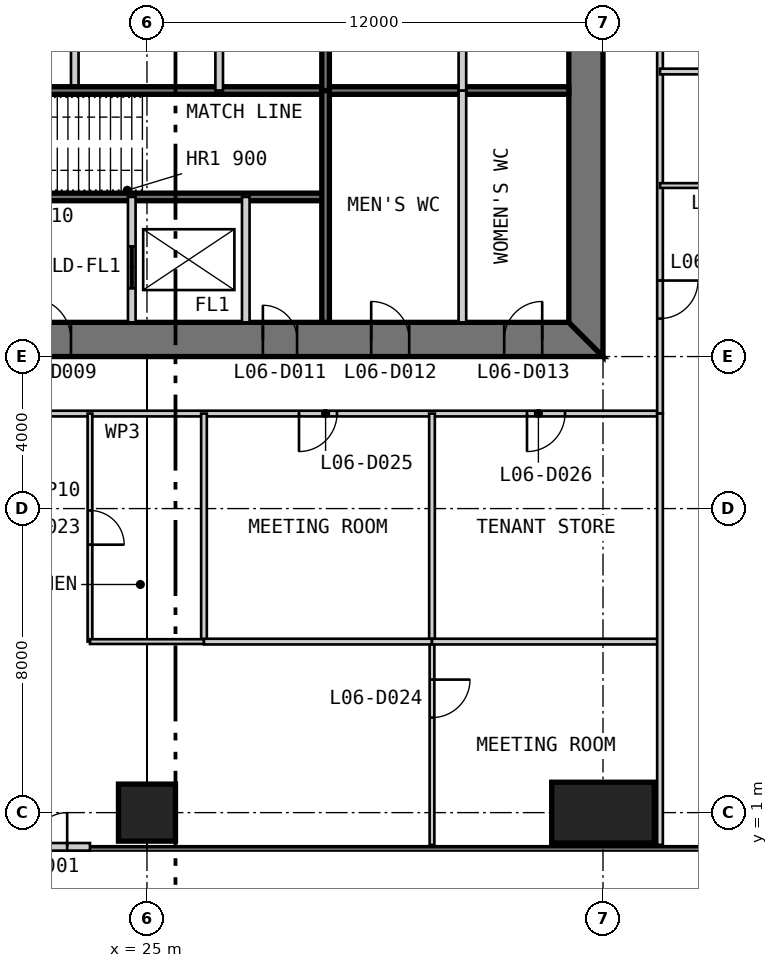
"""IFC4 building model, lengths in metres.
Left out: names, types, materials, properties, quantities, classifications, styles, units other than length and angle.
Written with IfcOpenShell. Run it as: python <this file> out.ifc"""

import sys

from ifc_helpers import new_model, si_unit, direction, frame, frame_2d, origin, origin_2d, place, context, subcontext, project, spatial, polyline, rectangle, outline, extrude, element, fill, save


model = new_model("IFC4")
c1 = context("Model", 3, precision=1e-05, world=origin(), true_north=direction((0.0, 1.0)))
c2 = subcontext(c1, "Body", "Model", "MODEL_VIEW")
j1 = project(units=[si_unit("LENGTHUNIT", "METRE"), si_unit("PLANEANGLEUNIT", "RADIAN")], contexts=[c1])
p1 = place(None, origin())
s1 = spatial("IfcSite", under=j1, at=p1, CompositionType="ELEMENT")
p2 = place(p1, origin())
s2 = spatial("IfcBuilding", under=s1, at=p2, CompositionType="ELEMENT")
p3 = place(p2, frame((0.0, 0.0, 31.0)))
s3 = spatial("IfcBuildingStorey", under=s2, at=p3, CompositionType="ELEMENT", Elevation=31.0)
p4 = place(p3, frame((25.0, 1.0, 0.0), z_axis=(0.0, 0.0, 1.0), x_axis=(1.0, 0.0, 0.0)))
e1 = element("IfcColumn", 1, at=p4, inside=s3, PredefinedType="COLUMN", context=c2, shape_type="SweptSolid", body=[
    extrude(rectangle(XDim=1.5, YDim=1.5, at=origin_2d()), origin(), (0.0, 0.0, 1.0), 4.0),
])
p5 = place(p3, frame((37.0, 1.0, 0.0), z_axis=(0.0, 0.0, 1.0), x_axis=(1.0, 0.0, 0.0)))
e2 = element("IfcColumn", 2, at=p5, inside=s3, PredefinedType="COLUMN", context=c2, shape_type="SweptSolid", body=[
    extrude(rectangle(XDim=2.7, YDim=1.6, at=origin_2d()), origin(), (0.0, 0.0, 1.0), 4.0),
])
p6 = place(p3, frame((13.0, 13.45, 0.0), z_axis=(0.0, 0.0, 1.0), x_axis=(1.0, 0.0, 0.0)))
e3 = element("IfcWall", 3, at=p6, inside=s3, PredefinedType="SHEAR", context=c2, shape_type="SweptSolid", body=[
    extrude(outline(polyline([(0.0, -0.45), (24.0, -0.45), (23.1, 0.45), (0.9, 0.45), (0.0, -0.45)])), origin(), (0.0, 0.0, 1.0), 4.0),
])
p7 = place(p6, frame((4.9, 0.0, 0.0)))
e4 = element("IfcOpeningElement", 4, at=p7, cuts=e3, PredefinedType="OPENING", context=c2, shape_type="SweptSolid", body=[
    extrude(rectangle(XDim=1.0, YDim=2.2, at=frame_2d((0.5, 1.1))), frame((0.0, 0.46, 0.0), z_axis=(0.0, -1.0, 0.0), x_axis=(1.0, 0.0, 0.0)), (0.0, 0.0, 1.0), 0.92),
])
p8 = place(p6, frame((8.9, 0.0, 0.0)))
e5 = element("IfcOpeningElement", 5, at=p8, cuts=e3, PredefinedType="OPENING", context=c2, shape_type="SweptSolid", body=[
    extrude(rectangle(XDim=1.1, YDim=2.2, at=frame_2d((0.55, 1.1))), frame((0.0, 0.46, 0.0), z_axis=(0.0, -1.0, 0.0), x_axis=(1.0, 0.0, 0.0)), (0.0, 0.0, 1.0), 0.92),
])
p9 = place(p6, frame((15.05, 0.0, 0.0)))
e6 = element("IfcOpeningElement", 6, at=p9, cuts=e3, PredefinedType="OPENING", context=c2, shape_type="SweptSolid", body=[
    extrude(rectangle(XDim=0.9, YDim=2.2, at=frame_2d((0.45, 1.1))), frame((0.0, 0.46, 0.0), z_axis=(0.0, -1.0, 0.0), x_axis=(1.0, 0.0, 0.0)), (0.0, 0.0, 1.0), 0.92),
])
p10 = place(p6, frame((17.9, 0.0, 0.0)))
e7 = element("IfcOpeningElement", 7, at=p10, cuts=e3, PredefinedType="OPENING", context=c2, shape_type="SweptSolid", body=[
    extrude(rectangle(XDim=1.0, YDim=2.2, at=frame_2d((0.5, 1.1))), frame((0.0, 0.46, 0.0), z_axis=(0.0, -1.0, 0.0), x_axis=(1.0, 0.0, 0.0)), (0.0, 0.0, 1.0), 0.92),
])
p11 = place(p6, frame((21.4, 0.0, 0.0)))
e8 = element("IfcOpeningElement", 8, at=p11, cuts=e3, PredefinedType="OPENING", context=c2, shape_type="SweptSolid", body=[
    extrude(rectangle(XDim=1.0, YDim=2.2, at=frame_2d((0.5, 1.1))), frame((0.0, 0.46, 0.0), z_axis=(0.0, -1.0, 0.0), x_axis=(1.0, 0.0, 0.0)), (0.0, 0.0, 1.0), 0.92),
])
p12 = place(p3, frame((36.55, 13.9, 0.0), z_axis=(0.0, 0.0, 1.0), x_axis=(0.0, 1.0, 0.0)))
e9 = element("IfcWall", 9, at=p12, inside=s3, PredefinedType="SHEAR", context=c2, shape_type="SweptSolid", body=[
    extrude(outline(polyline([(-0.9, -0.45), (23.1, -0.45), (22.2, 0.45), (0.0, 0.45), (-0.9, -0.45)])), origin(), (0.0, 0.0, 1.0), 4.0),
])
p13 = place(p12, frame((20.2, 0.0, 0.0)))
e10 = element("IfcOpeningElement", 10, at=p13, cuts=e9, PredefinedType="OPENING", context=c2, shape_type="SweptSolid", body=[
    extrude(rectangle(XDim=1.0, YDim=2.2, at=frame_2d((0.5, 1.1))), frame((0.0, 0.46, 0.0), z_axis=(0.0, -1.0, 0.0), x_axis=(1.0, 0.0, 0.0)), (0.0, 0.0, 1.0), 0.92),
])
p14 = place(p12, frame((17.25, 0.0, 0.0)))
e11 = element("IfcOpeningElement", 11, at=p14, cuts=e9, PredefinedType="OPENING", context=c2, shape_type="SweptSolid", body=[
    extrude(rectangle(XDim=0.9, YDim=2.2, at=frame_2d((0.45, 1.1))), frame((0.0, 0.46, 0.0), z_axis=(0.0, -1.0, 0.0), x_axis=(1.0, 0.0, 0.0)), (0.0, 0.0, 1.0), 0.92),
])
p15 = place(p3, frame((20.5, 0.1, 0.0), z_axis=(0.0, 0.0, 1.0), x_axis=(1.0, 0.0, 0.0)))
e12 = element("IfcWall", 12, at=p15, inside=s3, PredefinedType="SOLIDWALL", context=c2, shape_type="SweptSolid", body=[
    extrude(rectangle(XDim=3.0, YDim=0.2, at=frame_2d((1.5, 0.0))), origin(), (0.0, 0.0, 1.0), 3.85),
])
p16 = place(p15, frame((0.6, 0.0, 0.0)))
e13 = element("IfcOpeningElement", 13, at=p16, cuts=e12, PredefinedType="OPENING", context=c2, shape_type="SweptSolid", body=[
    extrude(rectangle(XDim=1.8, YDim=2.4, at=frame_2d((0.9, 1.2))), frame((0.0, 0.11, 0.0), z_axis=(0.0, -1.0, 0.0), x_axis=(1.0, 0.0, 0.0)), (0.0, 0.0, 1.0), 0.22),
])
p17 = place(p3, frame((23.1, 20.0, 0.0), z_axis=(0.0, 0.0, 1.0), x_axis=(0.0, 1.0, 0.0)))
e14 = element("IfcWall", 14, at=p17, inside=s3, PredefinedType="PARTITIONING", context=c2, shape_type="SweptSolid", body=[
    extrude(rectangle(XDim=10.0, YDim=0.2, at=frame_2d((5.0, 0.0))), origin(), (0.0, 0.0, 1.0), 3.8),
])
p18 = place(p3, frame((20.3, 17.2, 0.0), z_axis=(0.0, 0.0, 1.0), x_axis=(1.0, 0.0, 0.0)))
e15 = element("IfcWall", 15, at=p18, inside=s3, PredefinedType="SOLIDWALL", context=c2, shape_type="SweptSolid", body=[
    extrude(rectangle(XDim=9.4, YDim=0.2, at=frame_2d((4.7, 0.0))), origin(), (0.0, 0.0, 1.0), 3.8),
])
p19 = place(p18, frame((0.25, 0.0, 0.0)))
e16 = element("IfcOpeningElement", 16, at=p19, cuts=e15, PredefinedType="OPENING", context=c2, shape_type="SweptSolid", body=[
    extrude(rectangle(XDim=1.0, YDim=2.2, at=frame_2d((0.5, 1.1))), frame((0.0, 0.11, 0.0), z_axis=(0.0, -1.0, 0.0), x_axis=(1.0, 0.0, 0.0)), (0.0, 0.0, 1.0), 0.22),
])
p20 = place(p3, frame((20.3, 20.0, 0.0), z_axis=(0.0, 0.0, 1.0), x_axis=(1.0, 0.0, 0.0)))
e17 = element("IfcWall", 17, at=p20, inside=s3, PredefinedType="SOLIDWALL", context=c2, shape_type="SweptSolid", body=[
    extrude(rectangle(XDim=15.8, YDim=0.2, at=frame_2d((7.9, 0.0))), origin(), (0.0, 0.0, 1.0), 3.8),
])
p21 = place(p3, frame((24.6, 13.9, 0.0), z_axis=(0.0, 0.0, 1.0), x_axis=(0.0, 1.0, 0.0)))
e18 = element("IfcWall", 18, at=p21, inside=s3, PredefinedType="PARTITIONING", context=c2, shape_type="SweptSolid", body=[
    extrude(rectangle(XDim=3.3, YDim=0.2, at=frame_2d((1.65, 0.0))), origin(), (0.0, 0.0, 1.0), 3.8),
])
p22 = place(p21, frame((0.9, 0.0, 0.0)))
e19 = element("IfcOpeningElement", 19, at=p22, cuts=e18, PredefinedType="OPENING", context=c2, shape_type="SweptSolid", body=[
    extrude(rectangle(XDim=1.1, YDim=2.2, at=frame_2d((0.55, 1.1))), frame((0.0, 0.11, 0.0), z_axis=(0.0, -1.0, 0.0), x_axis=(1.0, 0.0, 0.0)), (0.0, 0.0, 1.0), 0.22),
])
p23 = place(p3, frame((27.6, 13.9, 0.0), z_axis=(0.0, 0.0, 1.0), x_axis=(0.0, 1.0, 0.0)))
e20 = element("IfcWall", 20, at=p23, inside=s3, PredefinedType="PARTITIONING", context=c2, shape_type="SweptSolid", body=[
    extrude(rectangle(XDim=3.3, YDim=0.2, at=frame_2d((1.65, 0.0))), origin(), (0.0, 0.0, 1.0), 3.8),
])
p24 = place(p3, frame((29.7, 13.9, 0.0), z_axis=(0.0, 0.0, 1.0), x_axis=(0.0, 1.0, 0.0)))
e21 = element("IfcWall", 21, at=p24, inside=s3, PredefinedType="SOLIDWALL", context=c2, shape_type="SweptSolid", body=[
    extrude(rectangle(XDim=6.1, YDim=0.2, at=frame_2d((3.05, 0.0))), origin(), (0.0, 0.0, 1.0), 3.8),
])
p25 = place(p3, frame((33.3, 13.9, 0.0), z_axis=(0.0, 0.0, 1.0), x_axis=(0.0, 1.0, 0.0)))
e22 = element("IfcWall", 22, at=p25, inside=s3, PredefinedType="PARTITIONING", context=c2, shape_type="SweptSolid", body=[
    extrude(rectangle(XDim=6.1, YDim=0.2, at=frame_2d((3.05, 0.0))), origin(), (0.0, 0.0, 1.0), 3.8),
])
p26 = place(p3, frame((33.3, 36.1, 0.0), z_axis=(0.0, 0.0, 1.0), x_axis=(0.0, -1.0, 0.0)))
e23 = element("IfcWall", 23, at=p26, inside=s3, PredefinedType="PARTITIONING", context=c2, shape_type="SweptSolid", body=[
    extrude(rectangle(XDim=16.1, YDim=0.2, at=frame_2d((8.05, 0.0))), origin(), (0.0, 0.0, 1.0), 3.8),
])
p27 = place(p3, frame((29.7, 36.1, 0.0), z_axis=(0.0, 0.0, 1.0), x_axis=(0.0, -1.0, 0.0)))
e24 = element("IfcWall", 24, at=p27, inside=s3, PredefinedType="SOLIDWALL", context=c2, shape_type="SweptSolid", body=[
    extrude(rectangle(XDim=16.1, YDim=0.2, at=frame_2d((8.05, 0.0))), origin(), (0.0, 0.0, 1.0), 3.8),
])
p28 = place(p3, frame((26.9, 30.0, 0.0), z_axis=(0.0, 0.0, 1.0), x_axis=(0.0, -1.0, 0.0)))
e25 = element("IfcWall", 25, at=p28, inside=s3, PredefinedType="PARTITIONING", context=c2, shape_type="SweptSolid", body=[
    extrude(rectangle(XDim=10.0, YDim=0.2, at=frame_2d((5.0, 0.0))), origin(), (0.0, 0.0, 1.0), 3.8),
])
p29 = place(p3, frame((11.5, 11.5, 0.0), z_axis=(0.0, 0.0, 1.0), x_axis=(1.0, 0.0, 0.0)))
e26 = element("IfcWall", 26, at=p29, inside=s3, PredefinedType="PARTITIONING", context=c2, shape_type="SweptSolid", body=[
    extrude(rectangle(XDim=27.0, YDim=0.15, at=frame_2d((13.5, 0.0))), origin(), (0.0, 0.0, 1.0), 3.85),
])
p30 = place(p29, frame((5.5, 0.0, 0.0)))
e27 = element("IfcOpeningElement", 27, at=p30, cuts=e26, PredefinedType="OPENING", context=c2, shape_type="SweptSolid", body=[
    extrude(rectangle(XDim=1.0, YDim=2.2, at=frame_2d((0.5, 1.1))), frame((0.0, 0.085, 0.0), z_axis=(0.0, -1.0, 0.0), x_axis=(1.0, 0.0, 0.0)), (0.0, 0.0, 1.0), 0.17),
])
p31 = place(p29, frame((17.5, 0.0, 0.0)))
e28 = element("IfcOpeningElement", 28, at=p31, cuts=e26, PredefinedType="OPENING", context=c2, shape_type="SweptSolid", body=[
    extrude(rectangle(XDim=1.0, YDim=2.2, at=frame_2d((0.5, 1.1))), frame((0.0, 0.085, 0.0), z_axis=(0.0, -1.0, 0.0), x_axis=(1.0, 0.0, 0.0)), (0.0, 0.0, 1.0), 0.17),
])
p32 = place(p29, frame((23.5, 0.0, 0.0)))
e29 = element("IfcOpeningElement", 29, at=p32, cuts=e26, PredefinedType="OPENING", context=c2, shape_type="SweptSolid", body=[
    extrude(rectangle(XDim=1.0, YDim=2.2, at=frame_2d((0.5, 1.1))), frame((0.0, 0.085, 0.0), z_axis=(0.0, -1.0, 0.0), x_axis=(1.0, 0.0, 0.0)), (0.0, 0.0, 1.0), 0.17),
])
p33 = place(p3, frame((23.5, 5.5, 0.0), z_axis=(0.0, 0.0, 1.0), x_axis=(0.0, 1.0, 0.0)))
e30 = element("IfcWall", 30, at=p33, inside=s3, PredefinedType="PARTITIONING", context=c2, shape_type="SweptSolid", body=[
    extrude(rectangle(XDim=6.0, YDim=0.125, at=frame_2d((3.0, 0.0))), origin(), (0.0, 0.0, 1.0), 3.85),
])
p34 = place(p33, frame((2.55, 0.0, 0.0)))
e31 = element("IfcOpeningElement", 31, at=p34, cuts=e30, PredefinedType="OPENING", context=c2, shape_type="SweptSolid", body=[
    extrude(rectangle(XDim=0.9, YDim=2.2, at=frame_2d((0.45, 1.1))), frame((0.0, 0.073, 0.0), z_axis=(0.0, -1.0, 0.0), x_axis=(1.0, 0.0, 0.0)), (0.0, 0.0, 1.0), 0.145),
])
p35 = place(p3, frame((26.5, 5.5, 0.0), z_axis=(0.0, 0.0, 1.0), x_axis=(0.0, 1.0, 0.0)))
e32 = element("IfcWall", 32, at=p35, inside=s3, PredefinedType="PARTITIONING", context=c2, shape_type="SweptSolid", body=[
    extrude(rectangle(XDim=6.0, YDim=0.15, at=frame_2d((3.0, 0.0))), origin(), (0.0, 0.0, 1.0), 3.85),
])
p36 = place(p3, frame((32.5, 0.15, 0.0), z_axis=(0.0, 0.0, 1.0), x_axis=(0.0, 1.0, 0.0)))
e33 = element("IfcWall", 33, at=p36, inside=s3, PredefinedType="PARTITIONING", context=c2, shape_type="SweptSolid", body=[
    extrude(rectangle(XDim=5.35, YDim=0.125, at=frame_2d((2.675, 0.0))), origin(), (0.0, 0.0, 1.0), 3.85),
])
p37 = place(p36, frame((3.35, 0.0, 0.0)))
e34 = element("IfcOpeningElement", 34, at=p37, cuts=e33, PredefinedType="OPENING", context=c2, shape_type="SweptSolid", body=[
    extrude(rectangle(XDim=1.0, YDim=2.2, at=frame_2d((0.5, 1.1))), frame((0.0, 0.073, 0.0), z_axis=(0.0, -1.0, 0.0), x_axis=(1.0, 0.0, 0.0)), (0.0, 0.0, 1.0), 0.145),
])
p38 = place(p3, frame((32.5, 5.5, 0.0), z_axis=(0.0, 0.0, 1.0), x_axis=(0.0, 1.0, 0.0)))
e35 = element("IfcWall", 35, at=p38, inside=s3, PredefinedType="PARTITIONING", context=c2, shape_type="SweptSolid", body=[
    extrude(rectangle(XDim=6.0, YDim=0.15, at=frame_2d((3.0, 0.0))), origin(), (0.0, 0.0, 1.0), 3.85),
])
p39 = place(p3, frame((23.5, 5.5, 0.0), z_axis=(0.0, 0.0, 1.0), x_axis=(1.0, 0.0, 0.0)))
e36 = element("IfcWall", 36, at=p39, inside=s3, PredefinedType="PARTITIONING", context=c2, shape_type="SweptSolid", body=[
    extrude(rectangle(XDim=3.0, YDim=0.125, at=frame_2d((1.5, 0.0))), origin(), (0.0, 0.0, 1.0), 3.85),
])
for number, where, z_axis, x_axis in (
    (37, (26.5, 5.5, 0.0), (0.0, 0.0, 1.0), (1.0, 0.0, 0.0)),
    (38, (32.5, 5.5, 0.0), (0.0, 0.0, 1.0), (1.0, 0.0, 0.0)),
):
    element("IfcWall", number, at=place(p3, frame(where, z_axis=z_axis, x_axis=x_axis)), inside=s3, PredefinedType="PARTITIONING", context=c2, shape_type="SweptSolid", body=[
        extrude(rectangle(XDim=6.0, YDim=0.15, at=frame_2d((3.0, 0.0))), origin(), (0.0, 0.0, 1.0), 3.85),
    ])
p40 = place(p3, frame((38.5, 11.5, 0.0), z_axis=(0.0, 0.0, 1.0), x_axis=(0.0, 1.0, 0.0)))
e39 = element("IfcWall", 39, at=p40, inside=s3, PredefinedType="PARTITIONING", context=c2, shape_type="SweptSolid", body=[
    extrude(rectangle(XDim=27.0, YDim=0.15, at=frame_2d((13.5, 0.0))), origin(), (0.0, 0.0, 1.0), 3.85),
])
p41 = place(p40, frame((2.5, 0.0, 0.0)))
e40 = element("IfcOpeningElement", 40, at=p41, cuts=e39, PredefinedType="OPENING", context=c2, shape_type="SweptSolid", body=[
    extrude(rectangle(XDim=1.0, YDim=2.2, at=frame_2d((0.5, 1.1))), frame((0.0, 0.085, 0.0), z_axis=(0.0, -1.0, 0.0), x_axis=(1.0, 0.0, 0.0)), (0.0, 0.0, 1.0), 0.17),
])
p42 = place(p40, frame((11.5, 0.0, 0.0)))
e41 = element("IfcOpeningElement", 41, at=p42, cuts=e39, PredefinedType="OPENING", context=c2, shape_type="SweptSolid", body=[
    extrude(rectangle(XDim=1.0, YDim=2.2, at=frame_2d((0.5, 1.1))), frame((0.0, 0.085, 0.0), z_axis=(0.0, -1.0, 0.0), x_axis=(1.0, 0.0, 0.0)), (0.0, 0.0, 1.0), 0.17),
])
p43 = place(p40, frame((17.5, 0.0, 0.0)))
e42 = element("IfcOpeningElement", 42, at=p43, cuts=e39, PredefinedType="OPENING", context=c2, shape_type="SweptSolid", body=[
    extrude(rectangle(XDim=1.0, YDim=2.2, at=frame_2d((0.5, 1.1))), frame((0.0, 0.085, 0.0), z_axis=(0.0, -1.0, 0.0), x_axis=(1.0, 0.0, 0.0)), (0.0, 0.0, 1.0), 0.17),
])
p44 = place(p40, frame((22.0, 0.0, 0.0)))
e43 = element("IfcOpeningElement", 43, at=p44, cuts=e39, PredefinedType="OPENING", context=c2, shape_type="SweptSolid", body=[
    extrude(rectangle(XDim=1.0, YDim=2.2, at=frame_2d((0.5, 1.1))), frame((0.0, 0.085, 0.0), z_axis=(0.0, -1.0, 0.0), x_axis=(1.0, 0.0, 0.0)), (0.0, 0.0, 1.0), 0.17),
])
p45 = place(p40, frame((25.0, 0.0, 0.0)))
e44 = element("IfcOpeningElement", 44, at=p45, cuts=e39, PredefinedType="OPENING", context=c2, shape_type="SweptSolid", body=[
    extrude(rectangle(XDim=1.0, YDim=2.2, at=frame_2d((0.5, 1.1))), frame((0.0, 0.085, 0.0), z_axis=(0.0, -1.0, 0.0), x_axis=(1.0, 0.0, 0.0)), (0.0, 0.0, 1.0), 0.17),
])
p46 = place(p3, frame((38.5, 0.15, 0.0), z_axis=(0.0, 0.0, 1.0), x_axis=(0.0, 1.0, 0.0)))
e45 = element("IfcWall", 45, at=p46, inside=s3, PredefinedType="PARTITIONING", context=c2, shape_type="SweptSolid", body=[
    extrude(rectangle(XDim=11.35, YDim=0.15, at=frame_2d((5.675, 0.0))), origin(), (0.0, 0.0, 1.0), 3.85),
])
p47 = place(p3, frame((44.5, 17.5, 0.0), z_axis=(0.0, 0.0, 1.0), x_axis=(-1.0, 0.0, 0.0)))
e46 = element("IfcWall", 46, at=p47, inside=s3, PredefinedType="PARTITIONING", context=c2, shape_type="SweptSolid", body=[
    extrude(rectangle(XDim=6.0, YDim=0.125, at=frame_2d((3.0, 0.0))), origin(), (0.0, 0.0, 1.0), 3.85),
])
p48 = place(p47, frame((2.55, 0.0, 0.0)))
e47 = element("IfcOpeningElement", 47, at=p48, cuts=e46, PredefinedType="OPENING", context=c2, shape_type="SweptSolid", body=[
    extrude(rectangle(XDim=0.9, YDim=2.2, at=frame_2d((0.45, 1.1))), frame((0.0, 0.073, 0.0), z_axis=(0.0, -1.0, 0.0), x_axis=(1.0, 0.0, 0.0)), (0.0, 0.0, 1.0), 0.145),
])
p49 = place(p3, frame((44.5, 20.5, 0.0), z_axis=(0.0, 0.0, 1.0), x_axis=(-1.0, 0.0, 0.0)))
e48 = element("IfcWall", 48, at=p49, inside=s3, PredefinedType="PARTITIONING", context=c2, shape_type="SweptSolid", body=[
    extrude(rectangle(XDim=6.0, YDim=0.15, at=frame_2d((3.0, 0.0))), origin(), (0.0, 0.0, 1.0), 3.85),
])
p50 = place(p16, origin())
e49 = element("IfcDoor", 49, at=p50, inside=s3, OperationType="DOUBLE_DOOR_SINGLE_SWING", PredefinedType="DOOR", context=c2, shape_type="SweptSolid", body=[
    extrude(rectangle(XDim=1.8, YDim=2.4, at=frame_2d((0.9, 1.2))), frame((0.0, 0.025, 0.0), z_axis=(0.0, -1.0, 0.0), x_axis=(1.0, 0.0, 0.0)), (0.0, 0.0, 1.0), 0.05),
])
fill(e13, e49)
p51 = place(p8, origin())
e50 = element("IfcDoor", 50, at=p51, inside=s3, OperationType="SINGLE_SWING_LEFT", PredefinedType="DOOR", context=c2, shape_type="SweptSolid", body=[
    extrude(rectangle(XDim=1.1, YDim=2.2, at=frame_2d((0.55, 1.1))), frame((0.0, 0.025, 0.0), z_axis=(0.0, -1.0, 0.0), x_axis=(1.0, 0.0, 0.0)), (0.0, 0.0, 1.0), 0.05),
    extrude(outline(polyline([(0.0, 0.0), (0.04, 0.0), (0.04, 2.16), (1.06, 2.16), (1.06, 0.0), (1.1, 0.0), (1.1, 2.2), (0.0, 2.2), (0.0, 0.0)])), frame((0.0, 0.3, 0.0), z_axis=(0.0, -1.0, 0.0), x_axis=(1.0, 0.0, 0.0)), (0.0, 0.0, 1.0), 0.6),
])
fill(e5, e50)
p52 = place(p9, origin())
e51 = element("IfcDoor", 51, at=p52, inside=s3, OperationType="SINGLE_SWING_LEFT", PredefinedType="DOOR", context=c2, shape_type="SweptSolid", body=[
    extrude(rectangle(XDim=0.9, YDim=2.2, at=frame_2d((0.45, 1.1))), frame((0.0, 0.025, 0.0), z_axis=(0.0, -1.0, 0.0), x_axis=(1.0, 0.0, 0.0)), (0.0, 0.0, 1.0), 0.05),
    extrude(outline(polyline([(0.0, 0.0), (0.04, 0.0), (0.04, 2.16), (0.86, 2.16), (0.86, 0.0), (0.9, 0.0), (0.9, 2.2), (0.0, 2.2), (0.0, 0.0)])), frame((0.0, 0.3, 0.0), z_axis=(0.0, -1.0, 0.0), x_axis=(1.0, 0.0, 0.0)), (0.0, 0.0, 1.0), 0.6),
])
fill(e6, e51)
p53 = place(p10, origin())
e52 = element("IfcDoor", 52, at=p53, inside=s3, OperationType="SINGLE_SWING_LEFT", PredefinedType="DOOR", context=c2, shape_type="SweptSolid", body=[
    extrude(rectangle(XDim=1.0, YDim=2.2, at=frame_2d((0.5, 1.1))), frame((0.0, 0.025, 0.0), z_axis=(0.0, -1.0, 0.0), x_axis=(1.0, 0.0, 0.0)), (0.0, 0.0, 1.0), 0.05),
    extrude(outline(polyline([(0.0, 0.0), (0.04, 0.0), (0.04, 2.16), (0.96, 2.16), (0.96, 0.0), (1.0, 0.0), (1.0, 2.2), (0.0, 2.2), (0.0, 0.0)])), frame((0.0, 0.3, 0.0), z_axis=(0.0, -1.0, 0.0), x_axis=(1.0, 0.0, 0.0)), (0.0, 0.0, 1.0), 0.6),
])
fill(e7, e52)
p54 = place(p11, origin())
e53 = element("IfcDoor", 53, at=p54, inside=s3, OperationType="SINGLE_SWING_RIGHT", PredefinedType="DOOR", context=c2, shape_type="SweptSolid", body=[
    extrude(rectangle(XDim=1.0, YDim=2.2, at=frame_2d((0.5, 1.1))), frame((0.0, 0.025, 0.0), z_axis=(0.0, -1.0, 0.0), x_axis=(1.0, 0.0, 0.0)), (0.0, 0.0, 1.0), 0.05),
    extrude(outline(polyline([(0.0, 0.0), (0.04, 0.0), (0.04, 2.16), (0.96, 2.16), (0.96, 0.0), (1.0, 0.0), (1.0, 2.2), (0.0, 2.2), (0.0, 0.0)])), frame((0.0, 0.3, 0.0), z_axis=(0.0, -1.0, 0.0), x_axis=(1.0, 0.0, 0.0)), (0.0, 0.0, 1.0), 0.6),
])
fill(e8, e53)
p55 = place(p34, frame((0.9, 0.0, 0.0), z_axis=(0.0, 0.0, 1.0), x_axis=(-1.0, 0.0, 0.0)))
e54 = element("IfcDoor", 54, at=p55, inside=s3, OperationType="SINGLE_SWING_RIGHT", PredefinedType="DOOR", context=c2, shape_type="SweptSolid", body=[
    extrude(rectangle(XDim=0.9, YDim=2.2, at=frame_2d((0.45, 1.1))), frame((0.0, 0.025, 0.0), z_axis=(0.0, -1.0, 0.0), x_axis=(1.0, 0.0, 0.0)), (0.0, 0.0, 1.0), 0.05),
])
fill(e31, e54)
p56 = place(p37, frame((1.0, 0.0, 0.0), z_axis=(0.0, 0.0, 1.0), x_axis=(-1.0, 0.0, 0.0)))
e55 = element("IfcDoor", 55, at=p56, inside=s3, OperationType="SINGLE_SWING_LEFT", PredefinedType="DOOR", context=c2, shape_type="SweptSolid", body=[
    extrude(rectangle(XDim=1.0, YDim=2.2, at=frame_2d((0.5, 1.1))), frame((0.0, 0.025, 0.0), z_axis=(0.0, -1.0, 0.0), x_axis=(1.0, 0.0, 0.0)), (0.0, 0.0, 1.0), 0.05),
])
fill(e34, e55)
p57 = place(p31, frame((1.0, 0.0, 0.0), z_axis=(0.0, 0.0, 1.0), x_axis=(-1.0, 0.0, 0.0)))
e56 = element("IfcDoor", 56, at=p57, inside=s3, OperationType="SINGLE_SWING_RIGHT", PredefinedType="DOOR", context=c2, shape_type="SweptSolid", body=[
    extrude(rectangle(XDim=1.0, YDim=2.2, at=frame_2d((0.5, 1.1))), frame((0.0, 0.025, 0.0), z_axis=(0.0, -1.0, 0.0), x_axis=(1.0, 0.0, 0.0)), (0.0, 0.0, 1.0), 0.05),
])
fill(e28, e56)
p58 = place(p32, frame((1.0, 0.0, 0.0), z_axis=(0.0, 0.0, 1.0), x_axis=(-1.0, 0.0, 0.0)))
e57 = element("IfcDoor", 57, at=p58, inside=s3, OperationType="SINGLE_SWING_RIGHT", PredefinedType="DOOR", context=c2, shape_type="SweptSolid", body=[
    extrude(rectangle(XDim=1.0, YDim=2.2, at=frame_2d((0.5, 1.1))), frame((0.0, 0.025, 0.0), z_axis=(0.0, -1.0, 0.0), x_axis=(1.0, 0.0, 0.0)), (0.0, 0.0, 1.0), 0.05),
])
fill(e29, e57)
p59 = place(p41, frame((1.0, 0.0, 0.0), z_axis=(0.0, 0.0, 1.0), x_axis=(-1.0, 0.0, 0.0)))
e58 = element("IfcDoor", 58, at=p59, inside=s3, OperationType="SINGLE_SWING_LEFT", PredefinedType="DOOR", context=c2, shape_type="SweptSolid", body=[
    extrude(rectangle(XDim=1.0, YDim=2.2, at=frame_2d((0.5, 1.1))), frame((0.0, 0.025, 0.0), z_axis=(0.0, -1.0, 0.0), x_axis=(1.0, 0.0, 0.0)), (0.0, 0.0, 1.0), 0.05),
])
fill(e40, e58)
p60 = place(p22, origin())
e59 = element("IfcDoor", 59, at=p60, inside=s3, OperationType="DOUBLE_DOOR_SLIDING", PredefinedType="DOOR", context=c2, shape_type="SweptSolid", body=[
    extrude(rectangle(XDim=1.1, YDim=2.2, at=frame_2d((0.55, 1.1))), frame((0.0, 0.025, 0.0), z_axis=(0.0, -1.0, 0.0), x_axis=(1.0, 0.0, 0.0)), (0.0, 0.0, 1.0), 0.05),
])
fill(e19, e59)
save(model, sys.argv[1])
